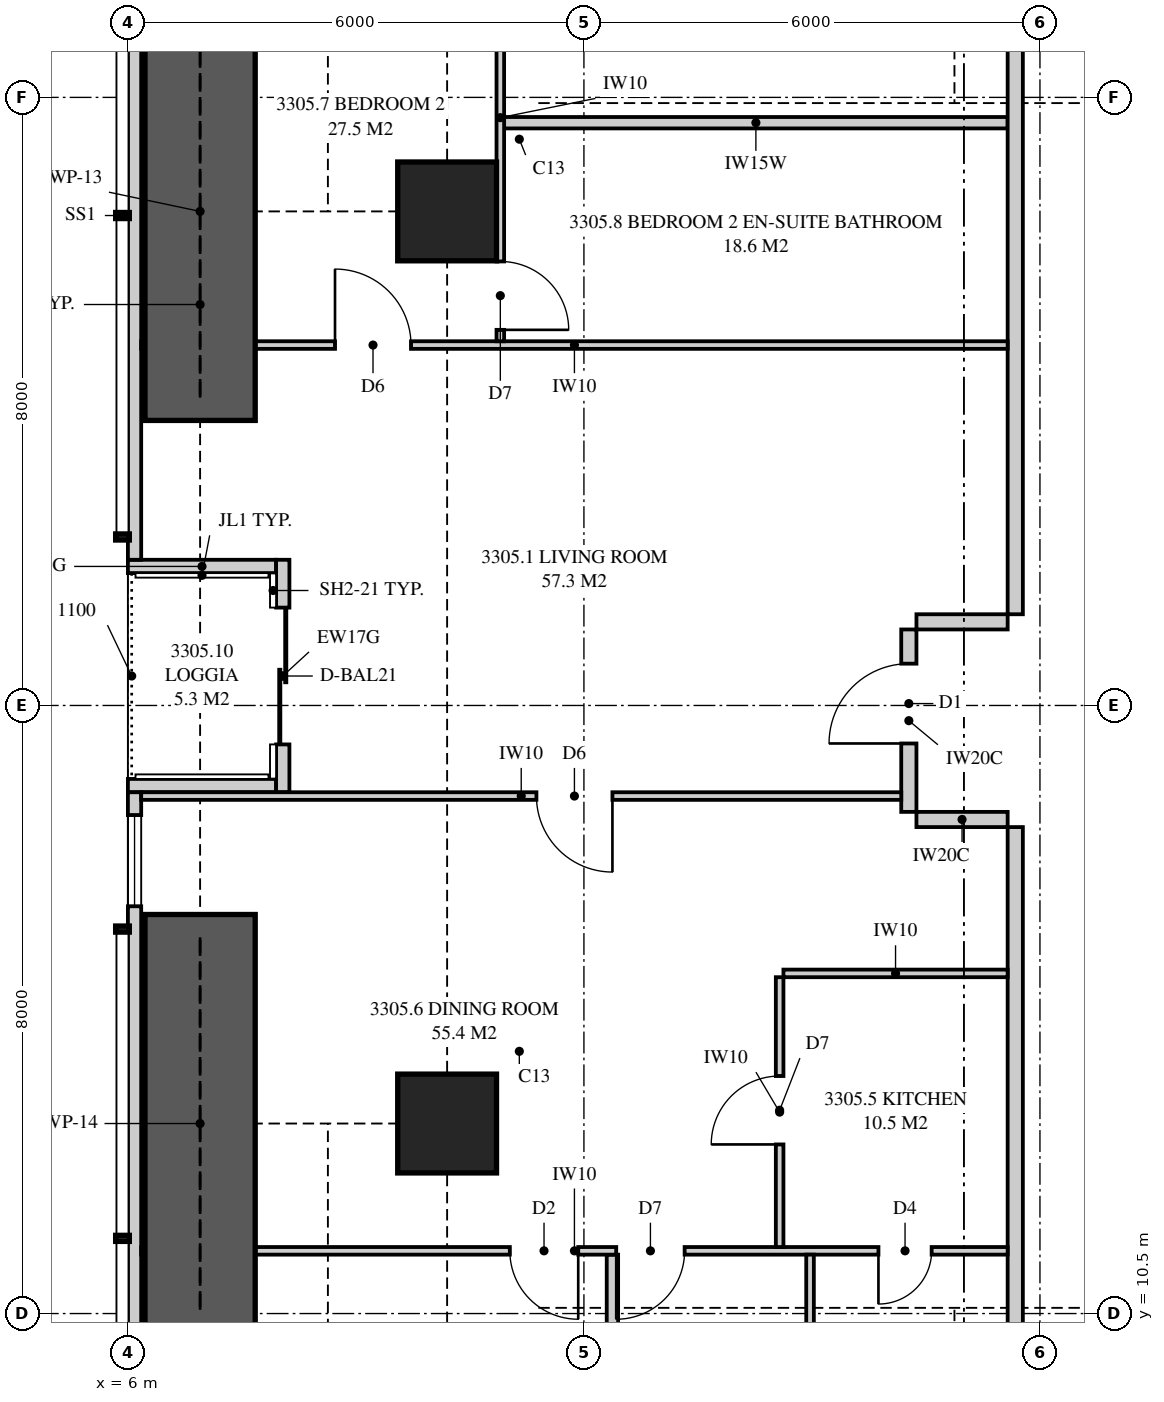
"""IFC4 building model, lengths in metres.
Left out: names, types, materials, properties, quantities, classifications, styles, units other than length and angle.
Written with IfcOpenShell. Run it as: python <this file> out.ifc"""

import sys

from ifc_helpers import new_model, si_unit, direction, frame, frame_2d, origin, origin_2d, place, context, subcontext, project, spatial, polyline, rectangle, outline, extrude, element, fill, save


model = new_model("IFC4")
c1 = context("Model", 3, precision=1e-05, world=origin(), true_north=direction((0.0, 1.0)))
c2 = subcontext(c1, "Body", "Model", "MODEL_VIEW")
j1 = project(units=[si_unit("LENGTHUNIT", "METRE"), si_unit("PLANEANGLEUNIT", "RADIAN")], contexts=[c1])
p1 = place(None, origin())
s1 = spatial("IfcSite", under=j1, at=p1, CompositionType="ELEMENT")
p2 = place(p1, origin())
s2 = spatial("IfcBuilding", under=s1, at=p2, CompositionType="ELEMENT")
p3 = place(p2, frame((0.0, 0.0, 121.6)))
s3 = spatial("IfcBuildingStorey", under=s2, at=p3, CompositionType="ELEMENT", Elevation=121.6)
for number, where, z_axis, x_axis in (
    (1, (10.2, 13.0, 0.0), (0.0, 0.0, 1.0), (1.0, 0.0, 0.0)),
    (2, (10.2, 25.0, 0.0), (0.0, 0.0, 1.0), (1.0, 0.0, 0.0)),
):
    element("IfcColumn", number, at=place(p3, frame(where, z_axis=z_axis, x_axis=x_axis)), inside=s3, PredefinedType="COLUMN", context=c2, shape_type="SweptSolid", body=[
        extrude(rectangle(XDim=1.3, YDim=1.3, at=origin_2d()), origin(), (0.0, 0.0, 1.0), 3.35),
    ])
p4 = place(p3, frame((6.087, 34.949, 0.0), z_axis=(0.0, 0.0, 1.0), x_axis=(0.0, -1.0, 0.0)))
e3 = element("IfcWall", 3, at=p4, inside=s3, PredefinedType="SOLIDWALL", context=c2, shape_type="SweptSolid", body=[
    extrude(outline(polyline([(0.0, 0.0), (14.532, 0.0), (14.532, 2.15), (9.949, 2.15), (9.949, 3.11), (9.823, 3.11), (9.823, 2.15), (9.73, 2.15), (9.73, 3.11), (0.0, 3.11), (0.0, 0.0)])), frame((0.0, 0.087, 0.0), z_axis=(0.0, -1.0, 0.0), x_axis=(1.0, 0.0, 0.0)), (0.0, 0.0, 1.0), 0.175),
])
p5 = place(p4, frame((0.636, 0.0, 0.4)))
e4 = element("IfcOpeningElement", 4, at=p5, cuts=e3, PredefinedType="OPENING", context=c2, shape_type="SweptSolid", body=[
    extrude(rectangle(XDim=2.4, YDim=1.7, at=frame_2d((1.2, 0.85))), frame((0.0, 0.097, 0.0), z_axis=(0.0, -1.0, 0.0), x_axis=(1.0, 0.0, 0.0)), (0.0, 0.0, 1.0), 0.195),
])
p6 = place(p4, frame((5.874, 0.0, 0.4)))
e5 = element("IfcOpeningElement", 5, at=p6, cuts=e3, PredefinedType="OPENING", context=c2, shape_type="SweptSolid", body=[
    extrude(rectangle(XDim=1.2, YDim=1.7, at=frame_2d((0.6, 0.85))), frame((0.0, 0.097, 0.0), z_axis=(0.0, -1.0, 0.0), x_axis=(1.0, 0.0, 0.0)), (0.0, 0.0, 1.0), 0.195),
])
p7 = place(p3, frame((6.087, 17.358, 0.0), z_axis=(0.0, 0.0, 1.0), x_axis=(0.0, -1.0, 0.0)))
e6 = element("IfcWall", 6, at=p7, inside=s3, PredefinedType="SOLIDWALL", context=c2, shape_type="SweptSolid", body=[
    extrude(outline(polyline([(0.0, 0.0), (14.307, 0.0), (14.307, 3.11), (4.577, 3.11), (4.577, 2.15), (4.484, 2.15), (4.484, 3.11), (4.358, 3.11), (4.358, 2.15), (0.0, 2.15), (0.0, 0.0)])), frame((0.0, 0.087, 0.0), z_axis=(0.0, -1.0, 0.0), x_axis=(1.0, 0.0, 0.0)), (0.0, 0.0, 1.0), 0.175),
])
p8 = place(p7, frame((0.3, 0.0, 0.4)))
e7 = element("IfcOpeningElement", 7, at=p8, cuts=e6, PredefinedType="OPENING", context=c2, shape_type="SweptSolid", body=[
    extrude(rectangle(XDim=1.2, YDim=1.7, at=frame_2d((0.6, 0.85))), frame((0.0, 0.097, 0.0), z_axis=(0.0, -1.0, 0.0), x_axis=(1.0, 0.0, 0.0)), (0.0, 0.0, 1.0), 0.195),
])
p9 = place(p7, frame((7.233, 0.0, 0.4)))
e8 = element("IfcOpeningElement", 8, at=p9, cuts=e6, PredefinedType="OPENING", context=c2, shape_type="SweptSolid", body=[
    extrude(rectangle(XDim=1.8, YDim=1.7, at=frame_2d((0.9, 0.85))), frame((0.0, 0.097, 0.0), z_axis=(0.0, -1.0, 0.0), x_axis=(1.0, 0.0, 0.0)), (0.0, 0.0, 1.0), 0.195),
])
p10 = place(p3, frame((8.038, 20.417, 0.0), z_axis=(0.0, 0.0, 1.0), x_axis=(0.0, -1.0, 0.0)))
e9 = element("IfcWall", 9, at=p10, inside=s3, PredefinedType="SOLIDWALL", context=c2, shape_type="SweptSolid", body=[
    extrude(rectangle(XDim=3.058, YDim=0.175, at=frame_2d((1.529, 0.0))), origin(), (0.0, 0.0, 1.0), 3.11),
])
p11 = place(p10, frame((0.629, 0.0, 0.0)))
e10 = element("IfcOpeningElement", 10, at=p11, cuts=e9, PredefinedType="OPENING", context=c2, shape_type="SweptSolid", body=[
    extrude(rectangle(XDim=1.8, YDim=2.1, at=frame_2d((0.9, 1.05))), frame((0.0, 0.097, 0.0), z_axis=(0.0, -1.0, 0.0), x_axis=(1.0, 0.0, 0.0)), (0.0, 0.0, 1.0), 0.195),
])
for number, where, z_axis, x_axis in (
    (11, (6.0, 20.329, 0.0), (0.0, 0.0, 1.0), (1.0, 0.0, 0.0)),
    (12, (6.0, 17.446, 0.0), (0.0, 0.0, 1.0), (1.0, 0.0, 0.0)),
):
    element("IfcWall", number, at=place(p3, frame(where, z_axis=z_axis, x_axis=x_axis)), inside=s3, PredefinedType="SOLIDWALL", context=c2, shape_type="SweptSolid", body=[
        extrude(outline(polyline([(0.0, 0.0), (1.95, 0.0), (1.95, 3.11), (1.75, 3.11), (1.75, 2.15), (0.15, 2.15), (0.15, 3.11), (0.0, 3.11), (0.0, 0.0)])), frame((0.0, 0.087, 0.0), z_axis=(0.0, -1.0, 0.0), x_axis=(1.0, 0.0, 0.0)), (0.0, 0.0, 1.0), 0.175),
    ])
p12 = place(p3, frame((17.675, 7.825, 0.0), z_axis=(0.0, 0.0, 1.0), x_axis=(0.0, 1.0, 0.0)))
e13 = element("IfcWall", 13, at=p12, inside=s3, PredefinedType="PARTITIONING", context=c2, shape_type="SweptSolid", body=[
    extrude(outline(polyline([(0.0, 0.0), (9.075, 0.0), (9.075, 3.11), (3.087, 3.11), (3.087, 2.541), (2.413, 2.541), (2.413, 3.11), (0.0, 3.11), (0.0, 0.0)])), frame((0.0, 0.1, 0.0), z_axis=(0.0, -1.0, 0.0), x_axis=(1.0, 0.0, 0.0)), (0.0, 0.0, 1.0), 0.2),
])
p13 = place(p3, frame((6.175, 11.325, 0.0), z_axis=(0.0, 0.0, 1.0), x_axis=(1.0, 0.0, 0.0)))
e14 = element("IfcWall", 14, at=p13, inside=s3, PredefinedType="PARTITIONING", context=c2, shape_type="SweptSolid", body=[
    extrude(outline(polyline([(0.175, 3.11), (0.0, 3.11), (0.0, 0.0), (0.529, 0.0), (0.529, 0.325), (1.021, 0.325), (1.021, 0.0), (11.4, 0.0), (11.4, 3.11), (5.285, 3.11), (5.285, 2.51), (2.765, 2.51), (2.765, 3.11), (2.744, 3.11), (2.744, 2.541), (2.169, 2.541), (2.169, 3.11), (1.918, 3.11), (1.918, 2.15), (1.021, 2.15), (1.021, 1.825), (0.529, 1.825), (0.529, 2.15), (0.175, 2.15), (0.175, 3.11)])), frame((0.0, 0.05, 0.0), z_axis=(0.0, -1.0, 0.0), x_axis=(1.0, 0.0, 0.0)), (0.0, 0.0, 1.0), 0.1),
])
p14 = place(p13, frame((4.85, 0.0, 0.0)))
e15 = element("IfcOpeningElement", 15, at=p14, cuts=e14, PredefinedType="OPENING", context=c2, shape_type="SweptSolid", body=[
    extrude(rectangle(XDim=0.9, YDim=2.1, at=frame_2d((0.45, 1.05))), frame((0.0, 0.06, 0.0), z_axis=(0.0, -1.0, 0.0), x_axis=(1.0, 0.0, 0.0)), (0.0, 0.0, 1.0), 0.12),
])
p15 = place(p13, frame((6.25, 0.0, 0.0)))
e16 = element("IfcOpeningElement", 16, at=p15, cuts=e14, PredefinedType="OPENING", context=c2, shape_type="SweptSolid", body=[
    extrude(rectangle(XDim=0.9, YDim=2.1, at=frame_2d((0.45, 1.05))), frame((0.0, 0.06, 0.0), z_axis=(0.0, -1.0, 0.0), x_axis=(1.0, 0.0, 0.0)), (0.0, 0.0, 1.0), 0.12),
])
p16 = place(p13, frame((9.7, 0.0, 0.0)))
e17 = element("IfcOpeningElement", 17, at=p16, cuts=e14, PredefinedType="OPENING", context=c2, shape_type="SweptSolid", body=[
    extrude(rectangle(XDim=0.7, YDim=2.1, at=frame_2d((0.35, 1.05))), frame((0.0, 0.06, 0.0), z_axis=(0.0, -1.0, 0.0), x_axis=(1.0, 0.0, 0.0)), (0.0, 0.0, 1.0), 0.12),
])
p17 = place(p3, frame((12.375, 7.825, 0.0), z_axis=(0.0, 0.0, 1.0), x_axis=(0.0, 1.0, 0.0)))
e18 = element("IfcWall", 18, at=p17, inside=s3, PredefinedType="PLUMBINGWALL", context=c2, shape_type="SweptSolid", body=[
    extrude(outline(polyline([(0.0, 0.0), (3.45, 0.0), (3.45, 3.11), (3.062, 3.11), (3.062, 2.541), (2.438, 2.541), (2.438, 3.11), (0.0, 3.11), (0.0, 0.0)])), frame((0.0, 0.075, 0.0), z_axis=(0.0, -1.0, 0.0), x_axis=(1.0, 0.0, 0.0)), (0.0, 0.0, 1.0), 0.15),
])
p18 = place(p3, frame((14.975, 7.825, 0.0), z_axis=(0.0, 0.0, 1.0), x_axis=(0.0, 1.0, 0.0)))
e19 = element("IfcWall", 19, at=p18, inside=s3, PredefinedType="PARTITIONING", context=c2, shape_type="SweptSolid", body=[
    extrude(outline(polyline([(0.0, 0.0), (3.45, 0.0), (3.45, 3.11), (3.037, 3.11), (3.037, 2.541), (2.463, 2.541), (2.463, 3.11), (0.0, 3.11), (0.0, 0.0)])), frame((0.0, 0.05, 0.0), z_axis=(0.0, -1.0, 0.0), x_axis=(1.0, 0.0, 0.0)), (0.0, 0.0, 1.0), 0.1),
])
p19 = place(p3, frame((14.575, 11.375, 0.0), z_axis=(0.0, 0.0, 1.0), x_axis=(0.0, 1.0, 0.0)))
e20 = element("IfcWall", 20, at=p19, inside=s3, PredefinedType="PARTITIONING", context=c2, shape_type="SweptSolid", body=[
    extrude(rectangle(XDim=3.55, YDim=0.1, at=frame_2d((1.775, 0.0))), origin(), (0.0, 0.0, 1.0), 3.11),
])
p20 = place(p19, frame((1.35, 0.0, 0.0)))
e21 = element("IfcOpeningElement", 21, at=p20, cuts=e20, PredefinedType="OPENING", context=c2, shape_type="SweptSolid", body=[
    extrude(rectangle(XDim=0.9, YDim=2.1, at=frame_2d((0.45, 1.05))), frame((0.0, 0.06, 0.0), z_axis=(0.0, -1.0, 0.0), x_axis=(1.0, 0.0, 0.0)), (0.0, 0.0, 1.0), 0.12),
])
p21 = place(p3, frame((14.625, 14.975, 0.0), z_axis=(0.0, 0.0, 1.0), x_axis=(1.0, 0.0, 0.0)))
e22 = element("IfcWall", 22, at=p21, inside=s3, PredefinedType="PARTITIONING", context=c2, shape_type="SweptSolid", body=[
    extrude(rectangle(XDim=2.95, YDim=0.1, at=frame_2d((1.475, 0.0))), origin(), (0.0, 0.0, 1.0), 3.11),
])
p22 = place(p3, frame((6.175, 17.308, 0.0), z_axis=(0.0, 0.0, 1.0), x_axis=(1.0, 0.0, 0.0)))
e23 = element("IfcWall", 23, at=p22, inside=s3, PredefinedType="PARTITIONING", context=c2, shape_type="SweptSolid", body=[
    extrude(outline(polyline([(0.0, 0.0), (10.0, 0.0), (10.0, 3.11), (5.285, 3.11), (5.285, 2.51), (2.765, 2.51), (2.765, 3.11), (1.635, 3.11), (1.635, 2.15), (0.0, 2.15), (0.0, 3.11), (0.0, 0.0)])), frame((0.0, 0.05, 0.0), z_axis=(0.0, -1.0, 0.0), x_axis=(1.0, 0.0, 0.0)), (0.0, 0.0, 1.0), 0.1),
])
p23 = place(p22, frame((5.2, 0.0, 0.0)))
e24 = element("IfcOpeningElement", 24, at=p23, cuts=e23, PredefinedType="OPENING", context=c2, shape_type="SweptSolid", body=[
    extrude(rectangle(XDim=1.0, YDim=2.1, at=frame_2d((0.5, 1.05))), frame((0.0, 0.06, 0.0), z_axis=(0.0, -1.0, 0.0), x_axis=(1.0, 0.0, 0.0)), (0.0, 0.0, 1.0), 0.12),
])
p24 = place(p3, frame((6.175, 23.242, 0.0), z_axis=(0.0, 0.0, 1.0), x_axis=(1.0, 0.0, 0.0)))
e25 = element("IfcWall", 25, at=p24, inside=s3, PredefinedType="PARTITIONING", context=c2, shape_type="SweptSolid", body=[
    extrude(outline(polyline([(0.529, 2.15), (0.0, 2.15), (0.0, 0.0), (0.529, 0.0), (0.529, 0.268), (1.021, 0.268), (1.021, 0.0), (11.4, 0.0), (11.4, 3.11), (5.285, 3.11), (5.285, 2.51), (2.765, 2.51), (2.765, 3.11), (1.635, 3.11), (1.635, 2.15), (1.021, 2.15), (1.021, 1.882), (0.529, 1.882), (0.529, 2.15)])), frame((0.0, 0.05, 0.0), z_axis=(0.0, -1.0, 0.0), x_axis=(1.0, 0.0, 0.0)), (0.0, 0.0, 1.0), 0.1),
])
p25 = place(p24, frame((2.55, 0.0, 0.0)))
e26 = element("IfcOpeningElement", 26, at=p25, cuts=e25, PredefinedType="OPENING", context=c2, shape_type="SweptSolid", body=[
    extrude(rectangle(XDim=1.0, YDim=2.1, at=frame_2d((0.5, 1.05))), frame((0.0, 0.06, 0.0), z_axis=(0.0, -1.0, 0.0), x_axis=(1.0, 0.0, 0.0)), (0.0, 0.0, 1.0), 0.12),
])
p26 = place(p3, frame((17.675, 19.7, 0.0), z_axis=(0.0, 0.0, 1.0), x_axis=(0.0, 1.0, 0.0)))
e27 = element("IfcWall", 27, at=p26, inside=s3, PredefinedType="PARTITIONING", context=c2, shape_type="SweptSolid", body=[
    extrude(outline(polyline([(0.0, 0.0), (9.475, 0.0), (9.475, 3.11), (7.062, 3.11), (7.062, 2.541), (6.388, 2.541), (6.388, 3.11), (0.0, 3.11), (0.0, 0.0)])), frame((0.0, 0.1, 0.0), z_axis=(0.0, -1.0, 0.0), x_axis=(1.0, 0.0, 0.0)), (0.0, 0.0, 1.0), 0.2),
])
p27 = place(p3, frame((16.275, 17.1, 0.0), z_axis=(0.0, 0.0, 1.0), x_axis=(0.0, 1.0, 0.0)))
e28 = element("IfcWall", 28, at=p27, inside=s3, PredefinedType="PARTITIONING", context=c2, shape_type="SweptSolid", body=[
    extrude(rectangle(XDim=2.4, YDim=0.2, at=frame_2d((1.2, 0.0))), origin(), (0.0, 0.0, 1.0), 3.11),
])
p28 = place(p27, frame((0.9, 0.0, 0.0)))
e29 = element("IfcOpeningElement", 29, at=p28, cuts=e28, PredefinedType="OPENING", context=c2, shape_type="SweptSolid", body=[
    extrude(rectangle(XDim=1.05, YDim=2.2, at=frame_2d((0.525, 1.1))), frame((0.0, 0.11, 0.0), z_axis=(0.0, -1.0, 0.0), x_axis=(1.0, 0.0, 0.0)), (0.0, 0.0, 1.0), 0.22),
])
for number, where, z_axis, x_axis in (
    (30, (17.575, 17.0, 0.0), (0.0, 0.0, 1.0), (-1.0, 0.0, 0.0)),
    (31, (17.575, 19.6, 0.0), (0.0, 0.0, 1.0), (-1.0, 0.0, 0.0)),
):
    element("IfcWall", number, at=place(p3, frame(where, z_axis=z_axis, x_axis=x_axis)), inside=s3, PredefinedType="PARTITIONING", context=c2, shape_type="SweptSolid", body=[
        extrude(rectangle(XDim=1.2, YDim=0.2, at=frame_2d((0.6, 0.0))), origin(), (0.0, 0.0, 1.0), 3.11),
    ])
p29 = place(p3, frame((10.9, 23.292, 0.0), z_axis=(0.0, 0.0, 1.0), x_axis=(0.0, 1.0, 0.0)))
e32 = element("IfcWall", 32, at=p29, inside=s3, PredefinedType="PARTITIONING", context=c2, shape_type="SweptSolid", body=[
    extrude(outline(polyline([(0.0, 0.0), (5.883, 0.0), (5.883, 3.11), (5.883, 2.51), (1.768, 2.51), (0.0, 2.51), (0.0, 3.11), (0.0, 0.0)])), frame((0.0, 0.05, 0.0), z_axis=(0.0, -1.0, 0.0), x_axis=(1.0, 0.0, 0.0)), (0.0, 0.0, 1.0), 0.1),
])
p30 = place(p29, frame((0.15, 0.0, 0.0)))
e33 = element("IfcOpeningElement", 33, at=p30, cuts=e32, PredefinedType="OPENING", context=c2, shape_type="SweptSolid", body=[
    extrude(rectangle(XDim=0.9, YDim=2.1, at=frame_2d((0.45, 1.05))), frame((0.0, 0.06, 0.0), z_axis=(0.0, -1.0, 0.0), x_axis=(1.0, 0.0, 0.0)), (0.0, 0.0, 1.0), 0.12),
])
p31 = place(p29, frame((4.017, 0.0, 0.0)))
e34 = element("IfcOpeningElement", 34, at=p31, cuts=e32, PredefinedType="OPENING", context=c2, shape_type="SweptSolid", body=[
    extrude(rectangle(XDim=0.9, YDim=2.1, at=frame_2d((0.45, 1.05))), frame((0.0, 0.06, 0.0), z_axis=(0.0, -1.0, 0.0), x_axis=(1.0, 0.0, 0.0)), (0.0, 0.0, 1.0), 0.12),
])
p32 = place(p3, frame((10.95, 26.167, 0.0), z_axis=(0.0, 0.0, 1.0), x_axis=(1.0, 0.0, 0.0)))
e35 = element("IfcWall", 35, at=p32, inside=s3, PredefinedType="PLUMBINGWALL", context=c2, shape_type="SweptSolid", body=[
    extrude(outline(polyline([(0.0, 0.0), (6.625, 0.0), (6.625, 3.11), (6.625, 2.541), (0.535, 2.541), (0.535, 2.51), (0.0, 2.51), (0.0, 3.11), (0.0, 0.0)])), frame((0.0, 0.075, 0.0), z_axis=(0.0, -1.0, 0.0), x_axis=(1.0, 0.0, 0.0)), (0.0, 0.0, 1.0), 0.15),
])
for number, where, z_axis, x_axis in (
    (36, (6.95, 22.25, 0.0), (0.0, 0.0, 1.0), (0.0, 1.0, 0.0)),
    (37, (6.95, 10.25, 0.0), (0.0, 0.0, 1.0), (0.0, 1.0, 0.0)),
):
    element("IfcWall", number, at=place(p3, frame(where, z_axis=z_axis, x_axis=x_axis)), inside=s3, PredefinedType="SHEAR", context=c2, shape_type="SweptSolid", body=[
        extrude(rectangle(XDim=5.5, YDim=1.45, at=frame_2d((2.75, 0.0))), origin(), (0.0, 0.0, 1.0), 3.35),
    ])
p33 = place(p11, origin())
e38 = element("IfcDoor", 38, at=p33, inside=s3, OperationType="SLIDING_TO_LEFT", PredefinedType="DOOR", context=c2, shape_type="SweptSolid", body=[
    extrude(rectangle(XDim=1.8, YDim=2.1, at=frame_2d((0.9, 1.05))), frame((0.0, 0.025, 0.0), z_axis=(0.0, -1.0, 0.0), x_axis=(1.0, 0.0, 0.0)), (0.0, 0.0, 1.0), 0.05),
])
fill(e10, e38)
p34 = place(p8, origin())
e39 = element("IfcWindow", 39, at=p34, inside=s3, PartitioningType="SINGLE_PANEL", PredefinedType="WINDOW", context=c2, shape_type="SweptSolid", body=[
    extrude(rectangle(XDim=1.2, YDim=1.7, at=frame_2d((0.6, 0.85))), frame((0.0, 0.03, 0.0), z_axis=(0.0, -1.0, 0.0), x_axis=(1.0, 0.0, 0.0)), (0.0, 0.0, 1.0), 0.06),
])
fill(e7, e39)
p35 = place(p28, origin())
e40 = element("IfcDoor", 40, at=p35, inside=s3, OperationType="SINGLE_SWING_LEFT", PredefinedType="DOOR", context=c2, shape_type="SweptSolid", body=[
    extrude(rectangle(XDim=1.05, YDim=2.2, at=frame_2d((0.525, 1.1))), frame((0.0, 0.025, 0.0), z_axis=(0.0, -1.0, 0.0), x_axis=(1.0, 0.0, 0.0)), (0.0, 0.0, 1.0), 0.05),
])
fill(e29, e40)
p36 = place(p14, frame((0.9, 0.0, 0.0), z_axis=(0.0, 0.0, 1.0), x_axis=(-1.0, 0.0, 0.0)))
e41 = element("IfcDoor", 41, at=p36, inside=s3, OperationType="SINGLE_SWING_LEFT", PredefinedType="DOOR", context=c2, shape_type="SweptSolid", body=[
    extrude(rectangle(XDim=0.9, YDim=2.1, at=frame_2d((0.45, 1.05))), frame((0.0, 0.025, 0.0), z_axis=(0.0, -1.0, 0.0), x_axis=(1.0, 0.0, 0.0)), (0.0, 0.0, 1.0), 0.05),
])
fill(e15, e41)
p37 = place(p15, frame((0.9, 0.0, 0.0), z_axis=(0.0, 0.0, 1.0), x_axis=(-1.0, 0.0, 0.0)))
e42 = element("IfcDoor", 42, at=p37, inside=s3, OperationType="SINGLE_SWING_RIGHT", PredefinedType="DOOR", context=c2, shape_type="SweptSolid", body=[
    extrude(rectangle(XDim=0.9, YDim=2.1, at=frame_2d((0.45, 1.05))), frame((0.0, 0.025, 0.0), z_axis=(0.0, -1.0, 0.0), x_axis=(1.0, 0.0, 0.0)), (0.0, 0.0, 1.0), 0.05),
])
fill(e16, e42)
p38 = place(p16, frame((0.7, 0.0, 0.0), z_axis=(0.0, 0.0, 1.0), x_axis=(-1.0, 0.0, 0.0)))
e43 = element("IfcDoor", 43, at=p38, inside=s3, OperationType="SINGLE_SWING_RIGHT", PredefinedType="DOOR", context=c2, shape_type="SweptSolid", body=[
    extrude(rectangle(XDim=0.7, YDim=2.1, at=frame_2d((0.35, 1.05))), frame((0.0, 0.025, 0.0), z_axis=(0.0, -1.0, 0.0), x_axis=(1.0, 0.0, 0.0)), (0.0, 0.0, 1.0), 0.05),
])
fill(e17, e43)
p39 = place(p20, origin())
e44 = element("IfcDoor", 44, at=p39, inside=s3, OperationType="SINGLE_SWING_LEFT", PredefinedType="DOOR", context=c2, shape_type="SweptSolid", body=[
    extrude(rectangle(XDim=0.9, YDim=2.1, at=frame_2d((0.45, 1.05))), frame((0.0, 0.025, 0.0), z_axis=(0.0, -1.0, 0.0), x_axis=(1.0, 0.0, 0.0)), (0.0, 0.0, 1.0), 0.05),
])
fill(e21, e44)
p40 = place(p23, frame((1.0, 0.0, 0.0), z_axis=(0.0, 0.0, 1.0), x_axis=(-1.0, 0.0, 0.0)))
e45 = element("IfcDoor", 45, at=p40, inside=s3, OperationType="SINGLE_SWING_LEFT", PredefinedType="DOOR", context=c2, shape_type="SweptSolid", body=[
    extrude(rectangle(XDim=1.0, YDim=2.1, at=frame_2d((0.5, 1.05))), frame((0.0, 0.025, 0.0), z_axis=(0.0, -1.0, 0.0), x_axis=(1.0, 0.0, 0.0)), (0.0, 0.0, 1.0), 0.05),
])
fill(e24, e45)
p41 = place(p25, origin())
e46 = element("IfcDoor", 46, at=p41, inside=s3, OperationType="SINGLE_SWING_LEFT", PredefinedType="DOOR", context=c2, shape_type="SweptSolid", body=[
    extrude(rectangle(XDim=1.0, YDim=2.1, at=frame_2d((0.5, 1.05))), frame((0.0, 0.025, 0.0), z_axis=(0.0, -1.0, 0.0), x_axis=(1.0, 0.0, 0.0)), (0.0, 0.0, 1.0), 0.05),
])
fill(e26, e46)
p42 = place(p30, frame((0.9, 0.0, 0.0), z_axis=(0.0, 0.0, 1.0), x_axis=(-1.0, 0.0, 0.0)))
e47 = element("IfcDoor", 47, at=p42, inside=s3, OperationType="SINGLE_SWING_RIGHT", PredefinedType="DOOR", context=c2, shape_type="SweptSolid", body=[
    extrude(rectangle(XDim=0.9, YDim=2.1, at=frame_2d((0.45, 1.05))), frame((0.0, 0.025, 0.0), z_axis=(0.0, -1.0, 0.0), x_axis=(1.0, 0.0, 0.0)), (0.0, 0.0, 1.0), 0.05),
])
fill(e33, e47)
save(model, sys.argv[1])
